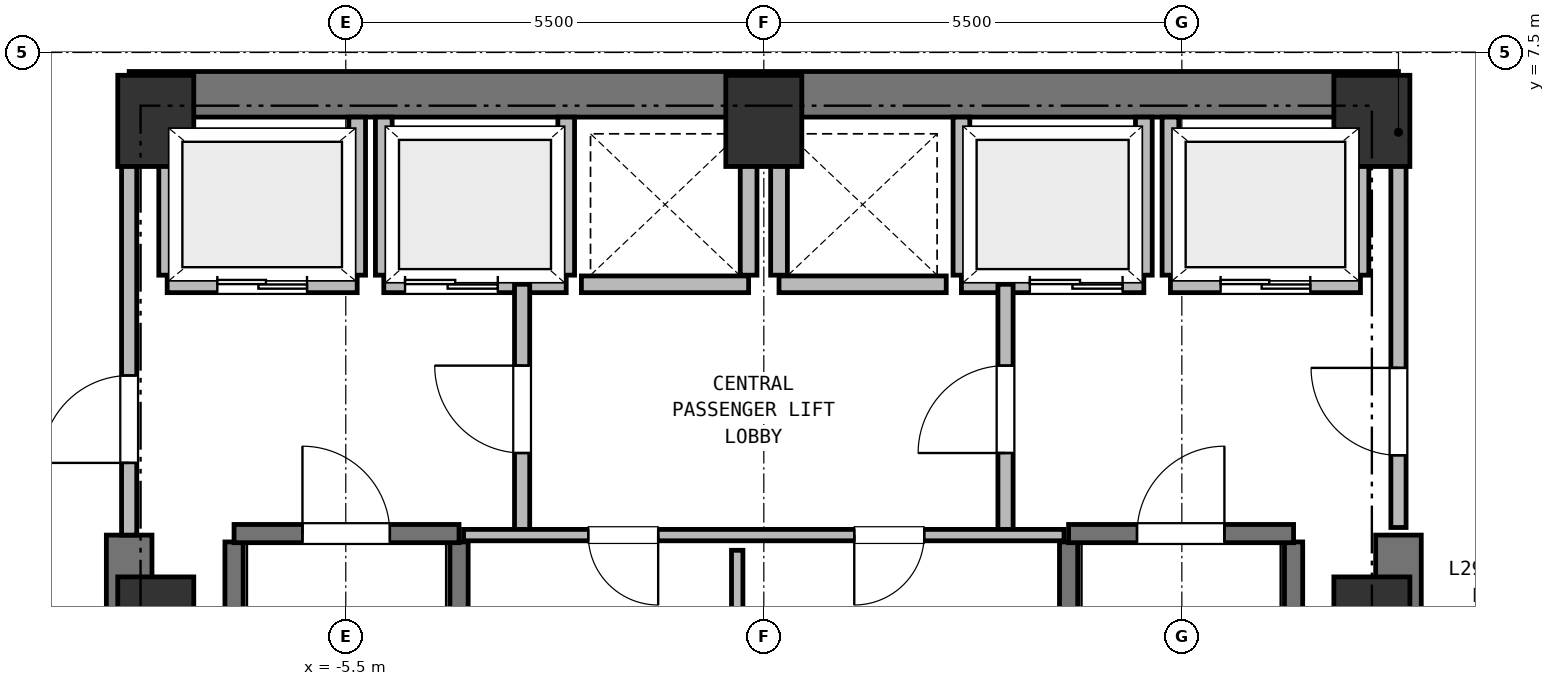
"""IFC4 building model, lengths in metres.
Left out: names, types, materials, properties, quantities, classifications, styles, units other than length and angle.
Written with IfcOpenShell. Run it as: python <this file> out.ifc"""

import sys

from ifc_helpers import new_model, si_unit, direction, frame, frame_2d, origin, origin_2d, place, context, subcontext, project, spatial, rectangle, extrude, element, fill, save


model = new_model("IFC4")
c1 = context("Model", 3, precision=1e-05, world=origin(), true_north=direction((0.0, 1.0)))
c2 = subcontext(c1, "Body", "Model", "MODEL_VIEW")
j1 = project(units=[si_unit("LENGTHUNIT", "METRE"), si_unit("PLANEANGLEUNIT", "RADIAN")], contexts=[c1])
p1 = place(None, origin())
s1 = spatial("IfcSite", under=j1, at=p1, CompositionType="ELEMENT")
p2 = place(p1, origin())
s2 = spatial("IfcBuilding", under=s1, at=p2, CompositionType="ELEMENT")
p3 = place(p2, frame((0.0, 0.0, 119.75)))
s3 = spatial("IfcBuildingStorey", under=s2, at=p3, CompositionType="ELEMENT", Elevation=119.75)
for number, where, z_axis, x_axis in (
    (1, (8.0, 0.0, 0.0), (0.0, 0.0, 1.0), (1.0, 0.0, 0.0)),
    (2, (8.0, 6.6, 0.0), (0.0, 0.0, 1.0), (1.0, 0.0, 0.0)),
    (3, (0.0, 6.6, 0.0), (0.0, 0.0, 1.0), (1.0, 0.0, 0.0)),
    (4, (-8.0, 6.6, 0.0), (0.0, 0.0, 1.0), (1.0, 0.0, 0.0)),
    (5, (-8.0, 0.0, 0.0), (0.0, 0.0, 1.0), (1.0, 0.0, 0.0)),
):
    element("IfcColumn", number, at=place(p3, frame(where, z_axis=z_axis, x_axis=x_axis)), inside=s3, PredefinedType="COLUMN", context=c2, shape_type="SweptSolid", body=[
        extrude(rectangle(XDim=1.0, YDim=1.2, at=origin_2d()), origin(), (0.0, 0.0, 1.0), 3.75),
    ])
p4 = place(p3, frame((-8.35, 6.95, 0.0), z_axis=(0.0, 0.0, 1.0), x_axis=(1.0, 0.0, 0.0)))
e6 = element("IfcWall", 6, at=p4, inside=s3, PredefinedType="SHEAR", context=c2, shape_type="SweptSolid", body=[
    extrude(rectangle(XDim=16.7, YDim=0.6, at=frame_2d((8.35, 0.0))), origin(), (0.0, 0.0, 1.0), 3.5),
])
for number, where, z_axis, x_axis in (
    (7, (-8.35, -6.95, 0.0), (0.0, 0.0, 1.0), (0.0, 1.0, 0.0)),
    (8, (8.35, -6.95, 0.0), (0.0, 0.0, 1.0), (0.0, 1.0, 0.0)),
):
    element("IfcWall", number, at=place(p3, frame(where, z_axis=z_axis, x_axis=x_axis)), inside=s3, PredefinedType="SHEAR", context=c2, shape_type="SweptSolid", body=[
        extrude(rectangle(XDim=8.1, YDim=0.6, at=frame_2d((4.05, 0.0))), origin(), (0.0, 0.0, 1.0), 3.5),
    ])
for number, where, z_axis, x_axis in (
    (9, (-6.97, -6.16, 0.0), (0.0, 0.0, 1.0), (0.0, 1.0, 0.0)),
    (10, (-4.01, -6.16, 0.0), (0.0, 0.0, 1.0), (0.0, 1.0, 0.0)),
):
    element("IfcWall", number, at=place(p3, frame(where, z_axis=z_axis, x_axis=x_axis)), inside=s3, PredefinedType="SHEAR", context=c2, shape_type="SweptSolid", body=[
        extrude(rectangle(XDim=7.22, YDim=0.24, at=frame_2d((3.61, 0.0))), origin(), (0.0, 0.0, 1.0), 3.5),
    ])
p5 = place(p3, frame((-6.97, 1.17, 0.0), z_axis=(0.0, 0.0, 1.0), x_axis=(1.0, 0.0, 0.0)))
e11 = element("IfcWall", 11, at=p5, inside=s3, PredefinedType="SHEAR", context=c2, shape_type="SweptSolid", body=[
    extrude(rectangle(XDim=2.96, YDim=0.24, at=frame_2d((1.48, 0.0))), origin(), (0.0, 0.0, 1.0), 3.5),
])
p6 = place(p5, frame((0.9, 0.0, 0.0)))
e12 = element("IfcOpeningElement", 12, at=p6, cuts=e11, PredefinedType="OPENING", context=c2, shape_type="SweptSolid", body=[
    extrude(rectangle(XDim=1.15, YDim=2.15, at=frame_2d((0.575, 1.075))), frame((0.0, 0.13, 0.0), z_axis=(0.0, -1.0, 0.0), x_axis=(1.0, 0.0, 0.0)), (0.0, 0.0, 1.0), 0.26),
])
for number, where, z_axis, x_axis in (
    (13, (4.01, -6.16, 0.0), (0.0, 0.0, 1.0), (0.0, 1.0, 0.0)),
    (14, (6.97, -6.16, 0.0), (0.0, 0.0, 1.0), (0.0, 1.0, 0.0)),
):
    element("IfcWall", number, at=place(p3, frame(where, z_axis=z_axis, x_axis=x_axis)), inside=s3, PredefinedType="SHEAR", context=c2, shape_type="SweptSolid", body=[
        extrude(rectangle(XDim=7.22, YDim=0.24, at=frame_2d((3.61, 0.0))), origin(), (0.0, 0.0, 1.0), 3.5),
    ])
p7 = place(p3, frame((4.01, 1.17, 0.0), z_axis=(0.0, 0.0, 1.0), x_axis=(1.0, 0.0, 0.0)))
e15 = element("IfcWall", 15, at=p7, inside=s3, PredefinedType="SHEAR", context=c2, shape_type="SweptSolid", body=[
    extrude(rectangle(XDim=2.96, YDim=0.24, at=frame_2d((1.48, 0.0))), origin(), (0.0, 0.0, 1.0), 3.5),
])
p8 = place(p7, frame((0.9, 0.0, 0.0)))
e16 = element("IfcOpeningElement", 16, at=p8, cuts=e15, PredefinedType="OPENING", context=c2, shape_type="SweptSolid", body=[
    extrude(rectangle(XDim=1.15, YDim=2.15, at=frame_2d((0.575, 1.075))), frame((0.0, 0.13, 0.0), z_axis=(0.0, -1.0, 0.0), x_axis=(1.0, 0.0, 0.0)), (0.0, 0.0, 1.0), 0.26),
])
p9 = place(p3, frame((-7.85, 4.45, 0.0), z_axis=(0.0, 0.0, 1.0), x_axis=(1.0, 0.0, 0.0)))
e17 = element("IfcWall", 17, at=p9, inside=s3, PredefinedType="PARTITIONING", context=c2, shape_type="SweptSolid", body=[
    extrude(rectangle(XDim=2.5, YDim=0.22, at=frame_2d((1.25, 0.0))), origin(), (0.0, 0.0, 1.0), 3.5),
])
p10 = place(p9, frame((0.66, 0.0, 0.0)))
e18 = element("IfcOpeningElement", 18, at=p10, cuts=e17, PredefinedType="OPENING", context=c2, shape_type="SweptSolid", body=[
    extrude(rectangle(XDim=1.18, YDim=2.15, at=frame_2d((0.59, 1.075))), frame((0.0, 0.12, 0.0), z_axis=(0.0, -1.0, 0.0), x_axis=(1.0, 0.0, 0.0)), (0.0, 0.0, 1.0), 0.24),
])
p11 = place(p3, frame((-7.85, 4.57, 0.0), z_axis=(0.0, 0.0, 1.0), x_axis=(0.0, 1.0, 0.0)))
e19 = element("IfcWall", 19, at=p11, inside=s3, PredefinedType="PARTITIONING", context=c2, shape_type="SweptSolid", body=[
    extrude(rectangle(XDim=2.08, YDim=0.22, at=frame_2d((1.04, 0.0))), origin(), (0.0, 0.0, 1.0), 3.12),
])
p12 = place(p3, frame((-5.35, 4.57, 0.0), z_axis=(0.0, 0.0, 1.0), x_axis=(0.0, 1.0, 0.0)))
e20 = element("IfcWall", 20, at=p12, inside=s3, PredefinedType="PARTITIONING", context=c2, shape_type="SweptSolid", body=[
    extrude(rectangle(XDim=2.08, YDim=0.22, at=frame_2d((1.04, 0.0))), origin(), (0.0, 0.0, 1.0), 3.5),
])
p13 = place(p3, frame((5.35, 4.45, 0.0), z_axis=(0.0, 0.0, 1.0), x_axis=(1.0, 0.0, 0.0)))
e21 = element("IfcWall", 21, at=p13, inside=s3, PredefinedType="PARTITIONING", context=c2, shape_type="SweptSolid", body=[
    extrude(rectangle(XDim=2.5, YDim=0.22, at=frame_2d((1.25, 0.0))), origin(), (0.0, 0.0, 1.0), 3.5),
])
p14 = place(p13, frame((0.66, 0.0, 0.0)))
e22 = element("IfcOpeningElement", 22, at=p14, cuts=e21, PredefinedType="OPENING", context=c2, shape_type="SweptSolid", body=[
    extrude(rectangle(XDim=1.18, YDim=2.15, at=frame_2d((0.59, 1.075))), frame((0.0, 0.12, 0.0), z_axis=(0.0, -1.0, 0.0), x_axis=(1.0, 0.0, 0.0)), (0.0, 0.0, 1.0), 0.24),
])
p15 = place(p3, frame((5.35, 4.57, 0.0), z_axis=(0.0, 0.0, 1.0), x_axis=(0.0, 1.0, 0.0)))
e23 = element("IfcWall", 23, at=p15, inside=s3, PredefinedType="PARTITIONING", context=c2, shape_type="SweptSolid", body=[
    extrude(rectangle(XDim=2.08, YDim=0.22, at=frame_2d((1.04, 0.0))), origin(), (0.0, 0.0, 1.0), 3.5),
])
p16 = place(p3, frame((7.85, 4.57, 0.0), z_axis=(0.0, 0.0, 1.0), x_axis=(0.0, 1.0, 0.0)))
e24 = element("IfcWall", 24, at=p16, inside=s3, PredefinedType="PARTITIONING", context=c2, shape_type="SweptSolid", body=[
    extrude(rectangle(XDim=2.08, YDim=0.22, at=frame_2d((1.04, 0.0))), origin(), (0.0, 0.0, 1.0), 3.12),
])
p17 = place(p3, frame((-5.0, 4.45, 0.0), z_axis=(0.0, 0.0, 1.0), x_axis=(1.0, 0.0, 0.0)))
e25 = element("IfcWall", 25, at=p17, inside=s3, PredefinedType="PARTITIONING", context=c2, shape_type="SweptSolid", body=[
    extrude(rectangle(XDim=2.4, YDim=0.22, at=frame_2d((1.2, 0.0))), origin(), (0.0, 0.0, 1.0), 3.5),
])
p18 = place(p17, frame((0.28, 0.0, 0.0)))
e26 = element("IfcOpeningElement", 26, at=p18, cuts=e25, PredefinedType="OPENING", context=c2, shape_type="SweptSolid", body=[
    extrude(rectangle(XDim=1.22, YDim=2.15, at=frame_2d((0.61, 1.075))), frame((0.0, 0.12, 0.0), z_axis=(0.0, -1.0, 0.0), x_axis=(1.0, 0.0, 0.0)), (0.0, 0.0, 1.0), 0.24),
])
for number, where, z_axis, x_axis in (
    (27, (-5.0, 4.57, 0.0), (0.0, 0.0, 1.0), (0.0, 1.0, 0.0)),
    (28, (-2.6, 4.57, 0.0), (0.0, 0.0, 1.0), (0.0, 1.0, 0.0)),
):
    element("IfcWall", number, at=place(p3, frame(where, z_axis=z_axis, x_axis=x_axis)), inside=s3, PredefinedType="PARTITIONING", context=c2, shape_type="SweptSolid", body=[
        extrude(rectangle(XDim=2.08, YDim=0.22, at=frame_2d((1.04, 0.0))), origin(), (0.0, 0.0, 1.0), 3.5),
    ])
p19 = place(p3, frame((2.6, 4.45, 0.0), z_axis=(0.0, 0.0, 1.0), x_axis=(1.0, 0.0, 0.0)))
e29 = element("IfcWall", 29, at=p19, inside=s3, PredefinedType="PARTITIONING", context=c2, shape_type="SweptSolid", body=[
    extrude(rectangle(XDim=2.4, YDim=0.22, at=frame_2d((1.2, 0.0))), origin(), (0.0, 0.0, 1.0), 3.5),
])
p20 = place(p19, frame((0.9, 0.0, 0.0)))
e30 = element("IfcOpeningElement", 30, at=p20, cuts=e29, PredefinedType="OPENING", context=c2, shape_type="SweptSolid", body=[
    extrude(rectangle(XDim=1.22, YDim=2.15, at=frame_2d((0.61, 1.075))), frame((0.0, 0.12, 0.0), z_axis=(0.0, -1.0, 0.0), x_axis=(1.0, 0.0, 0.0)), (0.0, 0.0, 1.0), 0.24),
])
for number, where, z_axis, x_axis in (
    (31, (2.6, 4.57, 0.0), (0.0, 0.0, 1.0), (0.0, 1.0, 0.0)),
    (32, (5.0, 4.57, 0.0), (0.0, 0.0, 1.0), (0.0, 1.0, 0.0)),
):
    element("IfcWall", number, at=place(p3, frame(where, z_axis=z_axis, x_axis=x_axis)), inside=s3, PredefinedType="PARTITIONING", context=c2, shape_type="SweptSolid", body=[
        extrude(rectangle(XDim=2.08, YDim=0.22, at=frame_2d((1.04, 0.0))), origin(), (0.0, 0.0, 1.0), 3.5),
    ])
p21 = place(p3, frame((-2.4, 4.45, 0.0), z_axis=(0.0, 0.0, 1.0), x_axis=(1.0, 0.0, 0.0)))
e33 = element("IfcWall", 33, at=p21, inside=s3, PredefinedType="PARTITIONING", context=c2, shape_type="SweptSolid", body=[
    extrude(rectangle(XDim=2.2, YDim=0.22, at=frame_2d((1.1, 0.0))), origin(), (0.0, 0.0, 1.0), 3.5),
])
p22 = place(p3, frame((-0.2, 4.57, 0.0), z_axis=(0.0, 0.0, 1.0), x_axis=(0.0, 1.0, 0.0)))
e34 = element("IfcWall", 34, at=p22, inside=s3, PredefinedType="PARTITIONING", context=c2, shape_type="SweptSolid", body=[
    extrude(rectangle(XDim=2.08, YDim=0.22, at=frame_2d((1.04, 0.0))), origin(), (0.0, 0.0, 1.0), 3.5),
])
p23 = place(p3, frame((0.2, 4.45, 0.0), z_axis=(0.0, 0.0, 1.0), x_axis=(1.0, 0.0, 0.0)))
e35 = element("IfcWall", 35, at=p23, inside=s3, PredefinedType="PARTITIONING", context=c2, shape_type="SweptSolid", body=[
    extrude(rectangle(XDim=2.2, YDim=0.22, at=frame_2d((1.1, 0.0))), origin(), (0.0, 0.0, 1.0), 3.5),
])
p24 = place(p3, frame((0.2, 4.57, 0.0), z_axis=(0.0, 0.0, 1.0), x_axis=(0.0, 1.0, 0.0)))
e36 = element("IfcWall", 36, at=p24, inside=s3, PredefinedType="PARTITIONING", context=c2, shape_type="SweptSolid", body=[
    extrude(rectangle(XDim=2.08, YDim=0.22, at=frame_2d((1.04, 0.0))), origin(), (0.0, 0.0, 1.0), 3.5),
])
p25 = place(p3, frame((-3.18, 1.15, 0.0), z_axis=(0.0, 0.0, 1.0), x_axis=(0.0, 1.0, 0.0)))
e37 = element("IfcWall", 37, at=p25, inside=s3, PredefinedType="PARTITIONING", context=c2, shape_type="SweptSolid", body=[
    extrude(rectangle(XDim=3.3, YDim=0.2, at=frame_2d((1.65, 0.0))), origin(), (0.0, 0.0, 1.0), 3.5),
])
p26 = place(p25, frame((1.08, 0.0, 0.0)))
e38 = element("IfcOpeningElement", 38, at=p26, cuts=e37, PredefinedType="OPENING", context=c2, shape_type="SweptSolid", body=[
    extrude(rectangle(XDim=1.15, YDim=2.15, at=frame_2d((0.575, 1.075))), frame((0.0, 0.11, 0.0), z_axis=(0.0, -1.0, 0.0), x_axis=(1.0, 0.0, 0.0)), (0.0, 0.0, 1.0), 0.22),
])
p27 = place(p3, frame((3.18, 1.15, 0.0), z_axis=(0.0, 0.0, 1.0), x_axis=(0.0, 1.0, 0.0)))
e39 = element("IfcWall", 39, at=p27, inside=s3, PredefinedType="PARTITIONING", context=c2, shape_type="SweptSolid", body=[
    extrude(rectangle(XDim=3.3, YDim=0.2, at=frame_2d((1.65, 0.0))), origin(), (0.0, 0.0, 1.0), 3.5),
])
p28 = place(p27, frame((1.08, 0.0, 0.0)))
e40 = element("IfcOpeningElement", 40, at=p28, cuts=e39, PredefinedType="OPENING", context=c2, shape_type="SweptSolid", body=[
    extrude(rectangle(XDim=1.15, YDim=2.15, at=frame_2d((0.575, 1.075))), frame((0.0, 0.11, 0.0), z_axis=(0.0, -1.0, 0.0), x_axis=(1.0, 0.0, 0.0)), (0.0, 0.0, 1.0), 0.22),
])
p29 = place(p3, frame((-8.35, 1.15, 0.0), z_axis=(0.0, 0.0, 1.0), x_axis=(0.0, 1.0, 0.0)))
e41 = element("IfcWall", 41, at=p29, inside=s3, PredefinedType="PARTITIONING", context=c2, shape_type="SweptSolid", body=[
    extrude(rectangle(XDim=5.4, YDim=0.2, at=frame_2d((2.7, 0.0))), origin(), (0.0, 0.0, 1.0), 3.5),
])
p30 = place(p29, frame((0.95, 0.0, 0.0)))
e42 = element("IfcOpeningElement", 42, at=p30, cuts=e41, PredefinedType="OPENING", context=c2, shape_type="SweptSolid", body=[
    extrude(rectangle(XDim=1.15, YDim=2.15, at=frame_2d((0.575, 1.075))), frame((0.0, 0.11, 0.0), z_axis=(0.0, -1.0, 0.0), x_axis=(1.0, 0.0, 0.0)), (0.0, 0.0, 1.0), 0.22),
])
p31 = place(p3, frame((8.35, 1.25, 0.0), z_axis=(0.0, 0.0, 1.0), x_axis=(0.0, 1.0, 0.0)))
e43 = element("IfcWall", 43, at=p31, inside=s3, PredefinedType="PARTITIONING", context=c2, shape_type="SweptSolid", body=[
    extrude(rectangle(XDim=5.3, YDim=0.2, at=frame_2d((2.65, 0.0))), origin(), (0.0, 0.0, 1.0), 3.5),
])
p32 = place(p31, frame((0.95, 0.0, 0.0)))
e44 = element("IfcOpeningElement", 44, at=p32, cuts=e43, PredefinedType="OPENING", context=c2, shape_type="SweptSolid", body=[
    extrude(rectangle(XDim=1.15, YDim=2.15, at=frame_2d((0.575, 1.075))), frame((0.0, 0.11, 0.0), z_axis=(0.0, -1.0, 0.0), x_axis=(1.0, 0.0, 0.0)), (0.0, 0.0, 1.0), 0.22),
])
p33 = place(p3, frame((3.95, 1.15, 0.0), z_axis=(0.0, 0.0, 1.0), x_axis=(-1.0, 0.0, 0.0)))
e45 = element("IfcWall", 45, at=p33, inside=s3, PredefinedType="PARTITIONING", context=c2, shape_type="SweptSolid", body=[
    extrude(rectangle(XDim=7.9, YDim=0.15, at=frame_2d((3.95, 0.0))), origin(), (0.0, 0.0, 1.0), 3.5),
])
p34 = place(p33, frame((5.34, 0.0, 0.0)))
e46 = element("IfcOpeningElement", 46, at=p34, cuts=e45, PredefinedType="OPENING", context=c2, shape_type="SweptSolid", body=[
    extrude(rectangle(XDim=0.92, YDim=2.05, at=frame_2d((0.46, 1.025))), frame((0.0, 0.085, 0.0), z_axis=(0.0, -1.0, 0.0), x_axis=(1.0, 0.0, 0.0)), (0.0, 0.0, 1.0), 0.17),
])
p35 = place(p33, frame((1.84, 0.0, 0.0)))
e47 = element("IfcOpeningElement", 47, at=p35, cuts=e45, PredefinedType="OPENING", context=c2, shape_type="SweptSolid", body=[
    extrude(rectangle(XDim=0.92, YDim=2.05, at=frame_2d((0.46, 1.025))), frame((0.0, 0.085, 0.0), z_axis=(0.0, -1.0, 0.0), x_axis=(1.0, 0.0, 0.0)), (0.0, 0.0, 1.0), 0.17),
])
p36 = place(p3, frame((-0.35, -1.73, 0.0), z_axis=(0.0, 0.0, 1.0), x_axis=(0.0, 1.0, 0.0)))
e48 = element("IfcWall", 48, at=p36, inside=s3, PredefinedType="PARTITIONING", context=c2, shape_type="SweptSolid", body=[
    extrude(rectangle(XDim=2.68, YDim=0.15, at=frame_2d((1.34, 0.0))), origin(), (0.0, 0.0, 1.0), 3.5),
])
for number, where, z_axis, x_axis in (
    (49, (8.678, 9.272, 0.0), (0.0, 0.0, 1.0), (0.707, -0.707, 0.0)),
    (50, (-10.722, 7.228, 0.0), (0.0, 0.0, 1.0), (0.707, 0.707, 0.0)),
):
    element("IfcWall", number, at=place(p3, frame(where, z_axis=z_axis, x_axis=x_axis)), inside=s3, PredefinedType="PARTITIONING", context=c2, shape_type="SweptSolid", body=[
        extrude(rectangle(XDim=2.89, YDim=0.15, at=frame_2d((1.445, 0.0))), origin(), (0.0, 0.0, 1.0), 3.5),
    ])
p37 = place(p6, origin())
e51 = element("IfcDoor", 51, at=p37, inside=s3, OperationType="SINGLE_SWING_LEFT", PredefinedType="DOOR", context=c2, shape_type="SweptSolid", body=[
    extrude(rectangle(XDim=1.15, YDim=2.15, at=frame_2d((0.575, 1.075))), frame((0.0, 0.025, 0.0), z_axis=(0.0, -1.0, 0.0), x_axis=(1.0, 0.0, 0.0)), (0.0, 0.0, 1.0), 0.05),
])
fill(e12, e51)
p38 = place(p8, origin())
e52 = element("IfcDoor", 52, at=p38, inside=s3, OperationType="SINGLE_SWING_RIGHT", PredefinedType="DOOR", context=c2, shape_type="SweptSolid", body=[
    extrude(rectangle(XDim=1.15, YDim=2.15, at=frame_2d((0.575, 1.075))), frame((0.0, 0.025, 0.0), z_axis=(0.0, -1.0, 0.0), x_axis=(1.0, 0.0, 0.0)), (0.0, 0.0, 1.0), 0.05),
])
fill(e16, e52)
p39 = place(p10, origin())
e53 = element("IfcDoor", 53, at=p39, inside=s3, OperationType="DOUBLE_DOOR_SLIDING", PredefinedType="DOOR", context=c2, shape_type="SweptSolid", body=[
    extrude(rectangle(XDim=1.18, YDim=2.15, at=frame_2d((0.59, 1.075))), frame((0.0, 0.025, 0.0), z_axis=(0.0, -1.0, 0.0), x_axis=(1.0, 0.0, 0.0)), (0.0, 0.0, 1.0), 0.05),
])
fill(e18, e53)
p40 = place(p14, origin())
e54 = element("IfcDoor", 54, at=p40, inside=s3, OperationType="DOUBLE_DOOR_SLIDING", PredefinedType="DOOR", context=c2, shape_type="SweptSolid", body=[
    extrude(rectangle(XDim=1.18, YDim=2.15, at=frame_2d((0.59, 1.075))), frame((0.0, 0.025, 0.0), z_axis=(0.0, -1.0, 0.0), x_axis=(1.0, 0.0, 0.0)), (0.0, 0.0, 1.0), 0.05),
])
fill(e22, e54)
p41 = place(p18, origin())
e55 = element("IfcDoor", 55, at=p41, inside=s3, OperationType="DOUBLE_DOOR_SLIDING", PredefinedType="DOOR", context=c2, shape_type="SweptSolid", body=[
    extrude(rectangle(XDim=1.22, YDim=2.15, at=frame_2d((0.61, 1.075))), frame((0.0, 0.025, 0.0), z_axis=(0.0, -1.0, 0.0), x_axis=(1.0, 0.0, 0.0)), (0.0, 0.0, 1.0), 0.05),
])
fill(e26, e55)
p42 = place(p20, origin())
e56 = element("IfcDoor", 56, at=p42, inside=s3, OperationType="DOUBLE_DOOR_SLIDING", PredefinedType="DOOR", context=c2, shape_type="SweptSolid", body=[
    extrude(rectangle(XDim=1.22, YDim=2.15, at=frame_2d((0.61, 1.075))), frame((0.0, 0.025, 0.0), z_axis=(0.0, -1.0, 0.0), x_axis=(1.0, 0.0, 0.0)), (0.0, 0.0, 1.0), 0.05),
])
fill(e30, e56)
p43 = place(p26, origin())
e57 = element("IfcDoor", 57, at=p43, inside=s3, OperationType="SINGLE_SWING_RIGHT", PredefinedType="DOOR", context=c2, shape_type="SweptSolid", body=[
    extrude(rectangle(XDim=1.15, YDim=2.15, at=frame_2d((0.575, 1.075))), frame((0.0, 0.025, 0.0), z_axis=(0.0, -1.0, 0.0), x_axis=(1.0, 0.0, 0.0)), (0.0, 0.0, 1.0), 0.05),
])
fill(e38, e57)
p44 = place(p28, origin())
e58 = element("IfcDoor", 58, at=p44, inside=s3, OperationType="SINGLE_SWING_LEFT", PredefinedType="DOOR", context=c2, shape_type="SweptSolid", body=[
    extrude(rectangle(XDim=1.15, YDim=2.15, at=frame_2d((0.575, 1.075))), frame((0.0, 0.025, 0.0), z_axis=(0.0, -1.0, 0.0), x_axis=(1.0, 0.0, 0.0)), (0.0, 0.0, 1.0), 0.05),
])
fill(e40, e58)
p45 = place(p30, origin())
e59 = element("IfcDoor", 59, at=p45, inside=s3, OperationType="SINGLE_SWING_LEFT", PredefinedType="DOOR", context=c2, shape_type="SweptSolid", body=[
    extrude(rectangle(XDim=1.15, YDim=2.15, at=frame_2d((0.575, 1.075))), frame((0.0, 0.025, 0.0), z_axis=(0.0, -1.0, 0.0), x_axis=(1.0, 0.0, 0.0)), (0.0, 0.0, 1.0), 0.05),
])
fill(e42, e59)
p46 = place(p32, origin())
e60 = element("IfcDoor", 60, at=p46, inside=s3, OperationType="SINGLE_SWING_RIGHT", PredefinedType="DOOR", context=c2, shape_type="SweptSolid", body=[
    extrude(rectangle(XDim=1.15, YDim=2.15, at=frame_2d((0.575, 1.075))), frame((0.0, 0.025, 0.0), z_axis=(0.0, -1.0, 0.0), x_axis=(1.0, 0.0, 0.0)), (0.0, 0.0, 1.0), 0.05),
])
fill(e44, e60)
p47 = place(p34, origin())
e61 = element("IfcDoor", 61, at=p47, inside=s3, OperationType="SINGLE_SWING_LEFT", PredefinedType="DOOR", context=c2, shape_type="SweptSolid", body=[
    extrude(rectangle(XDim=0.92, YDim=2.05, at=frame_2d((0.46, 1.025))), frame((0.0, 0.025, 0.0), z_axis=(0.0, -1.0, 0.0), x_axis=(1.0, 0.0, 0.0)), (0.0, 0.0, 1.0), 0.05),
])
fill(e46, e61)
p48 = place(p35, origin())
e62 = element("IfcDoor", 62, at=p48, inside=s3, OperationType="SINGLE_SWING_RIGHT", PredefinedType="DOOR", context=c2, shape_type="SweptSolid", body=[
    extrude(rectangle(XDim=0.92, YDim=2.05, at=frame_2d((0.46, 1.025))), frame((0.0, 0.025, 0.0), z_axis=(0.0, -1.0, 0.0), x_axis=(1.0, 0.0, 0.0)), (0.0, 0.0, 1.0), 0.05),
])
fill(e47, e62)
save(model, sys.argv[1])
